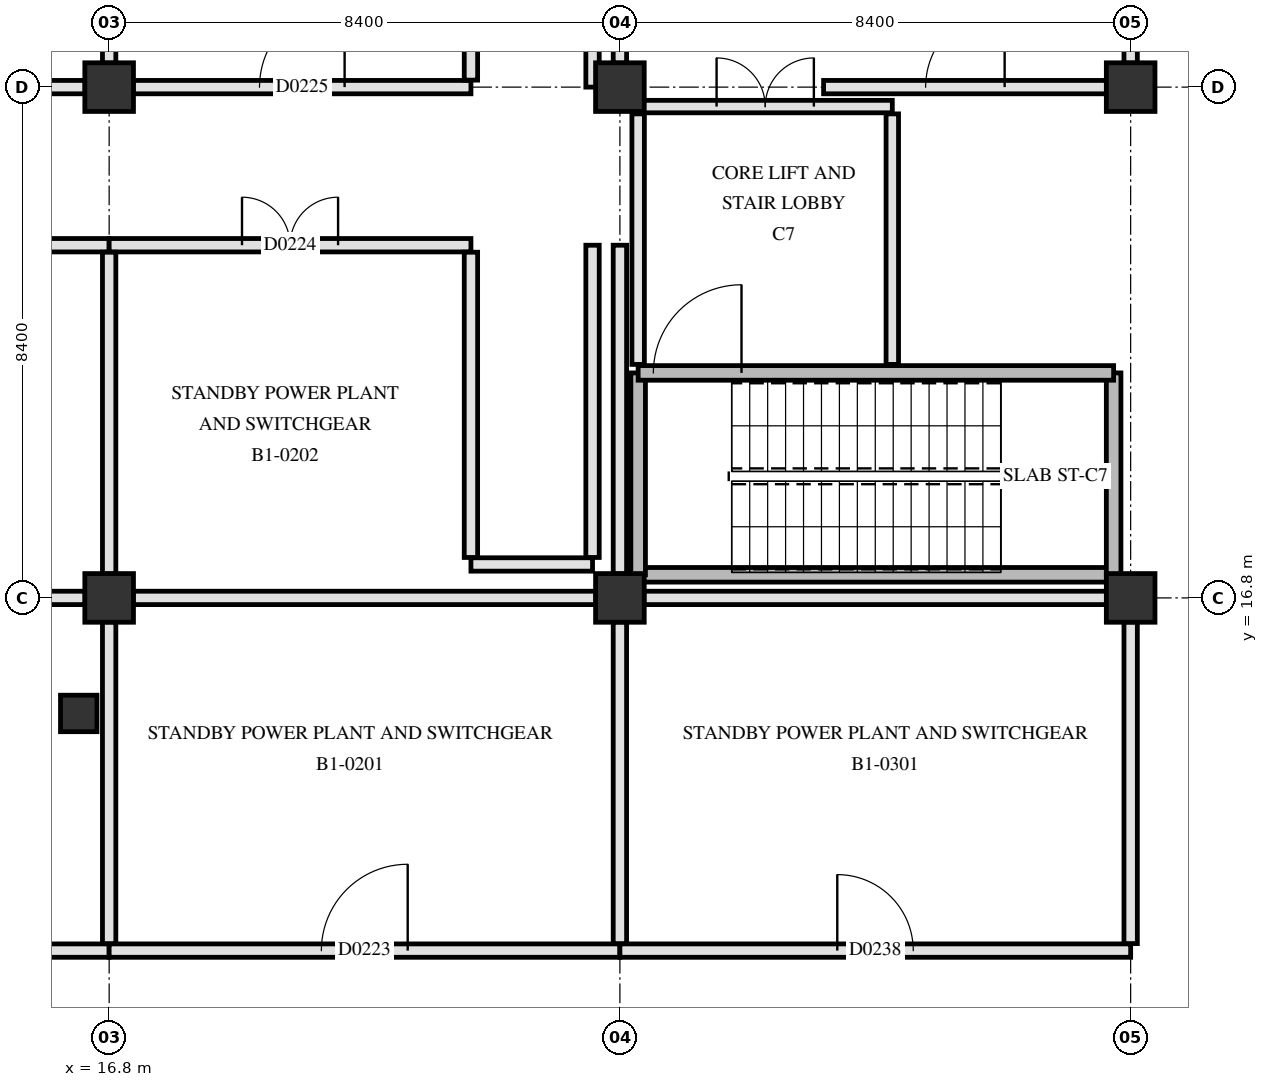
"""IFC4 building model, lengths in metres.
Left out: names, types, materials, properties, quantities, classifications, styles, units other than length and angle.
Written with IfcOpenShell. Run it as: python <this file> out.ifc"""

import sys

from ifc_helpers import new_model, si_unit, direction, frame, frame_2d, origin, origin_2d, place, context, subcontext, project, spatial, rectangle, extrude, element, fill, save


model = new_model("IFC4")
c1 = context("Model", 3, precision=1e-05, world=origin(), true_north=direction((0.0, 1.0)))
c2 = subcontext(c1, "Body", "Model", "MODEL_VIEW")
j1 = project(units=[si_unit("LENGTHUNIT", "METRE"), si_unit("PLANEANGLEUNIT", "RADIAN")], contexts=[c1])
p1 = place(None, origin())
s1 = spatial("IfcSite", under=j1, at=p1, CompositionType="ELEMENT")
p2 = place(p1, origin())
s2 = spatial("IfcBuilding", under=s1, at=p2, CompositionType="ELEMENT")
p3 = place(p2, frame((0.0, 0.0, -5.4)))
s3 = spatial("IfcBuildingStorey", under=s2, at=p3, CompositionType="ELEMENT", Elevation=-5.4)
for number, where, z_axis, x_axis in (
    (1, (16.8, 16.8, 0.0), (0.0, 0.0, 1.0), (1.0, 0.0, 0.0)),
    (2, (16.8, 25.2, 0.0), (0.0, 0.0, 1.0), (1.0, 0.0, 0.0)),
    (3, (25.2, 16.8, 0.0), (0.0, 0.0, 1.0), (1.0, 0.0, 0.0)),
    (4, (25.2, 25.2, 0.0), (0.0, 0.0, 1.0), (1.0, 0.0, 0.0)),
    (5, (33.6, 16.8, 0.0), (0.0, 0.0, 1.0), (1.0, 0.0, 0.0)),
    (6, (33.6, 25.2, 0.0), (0.0, 0.0, 1.0), (1.0, 0.0, 0.0)),
):
    element("IfcColumn", number, at=place(p3, frame(where, z_axis=z_axis, x_axis=x_axis)), inside=s3, PredefinedType="COLUMN", context=c2, shape_type="SweptSolid", body=[
        extrude(rectangle(XDim=0.8, YDim=0.8, at=origin_2d()), origin(), (0.0, 0.0, 1.0), 5.4),
    ])
p4 = place(p3, frame((16.3, 14.9, 0.0), z_axis=(0.0, 0.0, 1.0), x_axis=(1.0, 0.0, 0.0)))
e7 = element("IfcColumn", 7, at=p4, inside=s3, PredefinedType="COLUMN", context=c2, shape_type="SweptSolid", body=[
    extrude(rectangle(XDim=0.6, YDim=0.6, at=origin_2d()), origin(), (0.0, 0.0, 1.0), 5.09),
])
p5 = place(p3, frame((25.5, 17.18, 0.0), z_axis=(0.0, 0.0, 1.0), x_axis=(1.0, 0.0, 0.0)))
e8 = element("IfcWall", 8, at=p5, inside=s3, PredefinedType="SHEAR", context=c2, shape_type="SweptSolid", body=[
    extrude(rectangle(XDim=7.82, YDim=0.24, at=frame_2d((3.91, 0.0))), origin(), (0.0, 0.0, 1.0), 5.08),
])
for number, where, z_axis, x_axis in (
    (9, (25.5, 17.18, 0.0), (0.0, 0.0, 1.0), (0.0, 1.0, 0.0)),
    (10, (33.32, 17.18, 0.0), (0.0, 0.0, 1.0), (0.0, 1.0, 0.0)),
):
    element("IfcWall", number, at=place(p3, frame(where, z_axis=z_axis, x_axis=x_axis)), inside=s3, PredefinedType="SHEAR", context=c2, shape_type="SweptSolid", body=[
        extrude(rectangle(XDim=3.32, YDim=0.24, at=frame_2d((1.66, 0.0))), origin(), (0.0, 0.0, 1.0), 5.08),
    ])
p6 = place(p3, frame((25.5, 20.5, 0.0), z_axis=(0.0, 0.0, 1.0), x_axis=(1.0, 0.0, 0.0)))
e11 = element("IfcWall", 11, at=p6, inside=s3, PredefinedType="SHEAR", context=c2, shape_type="SweptSolid", body=[
    extrude(rectangle(XDim=7.82, YDim=0.24, at=frame_2d((3.91, 0.0))), origin(), (0.0, 0.0, 1.0), 5.08),
])
p7 = place(p6, frame((0.25, 0.0, 0.0)))
e12 = element("IfcOpeningElement", 12, at=p7, cuts=e11, PredefinedType="OPENING", context=c2, shape_type="SweptSolid", body=[
    extrude(rectangle(XDim=1.45, YDim=2.2, at=frame_2d((0.725, 1.1))), frame((0.0, 0.13, 0.0), z_axis=(0.0, -1.0, 0.0), x_axis=(1.0, 0.0, 0.0)), (0.0, 0.0, 1.0), 0.26),
])
p8 = place(p3, frame((29.68, 20.64, 0.0), z_axis=(0.0, 0.0, 1.0), x_axis=(0.0, 1.0, 0.0)))
e13 = element("IfcWall", 13, at=p8, inside=s3, PredefinedType="PARTITIONING", context=c2, shape_type="SweptSolid", body=[
    extrude(rectangle(XDim=4.12, YDim=0.205, at=frame_2d((2.06, 0.0))), origin(), (0.0, 0.0, 1.0), 5.07),
])
p9 = place(p3, frame((25.5, 20.64, 0.0), z_axis=(0.0, 0.0, 1.0), x_axis=(0.0, 1.0, 0.0)))
e14 = element("IfcWall", 14, at=p9, inside=s3, PredefinedType="PARTITIONING", context=c2, shape_type="SweptSolid", body=[
    extrude(rectangle(XDim=4.12, YDim=0.205, at=frame_2d((2.06, 0.0))), origin(), (0.0, 0.0, 1.0), 4.47),
])
p10 = place(p3, frame((25.5, 24.88, 0.0), z_axis=(0.0, 0.0, 1.0), x_axis=(1.0, 0.0, 0.0)))
e15 = element("IfcWall", 15, at=p10, inside=s3, PredefinedType="PARTITIONING", context=c2, shape_type="SweptSolid", body=[
    extrude(rectangle(XDim=4.18, YDim=0.205, at=frame_2d((2.09, 0.0))), origin(), (0.0, 0.0, 1.0), 4.42),
])
p11 = place(p10, frame((1.29, 0.0, 0.0)))
e16 = element("IfcOpeningElement", 16, at=p11, cuts=e15, PredefinedType="OPENING", context=c2, shape_type="SweptSolid", body=[
    extrude(rectangle(XDim=1.6, YDim=2.25, at=frame_2d((0.8, 1.125))), frame((0.0, 0.113, 0.0), z_axis=(0.0, -1.0, 0.0), x_axis=(1.0, 0.0, 0.0)), (0.0, 0.0, 1.0), 0.225),
])
p12 = place(p3, frame((8.4, 11.0, 0.0), z_axis=(0.0, 0.0, 1.0), x_axis=(1.0, 0.0, 0.0)))
e17 = element("IfcWall", 17, at=p12, inside=s3, PredefinedType="PARTITIONING", context=c2, shape_type="SweptSolid", body=[
    extrude(rectangle(XDim=8.4, YDim=0.22, at=frame_2d((4.2, 0.0))), origin(), (0.0, 0.0, 1.0), 4.47),
])
p13 = place(p12, frame((3.55, 0.0, 0.0)))
e18 = element("IfcOpeningElement", 18, at=p13, cuts=e17, PredefinedType="OPENING", context=c2, shape_type="SweptSolid", body=[
    extrude(rectangle(XDim=1.3, YDim=2.2, at=frame_2d((0.65, 1.1))), frame((0.0, 0.12, 0.0), z_axis=(0.0, -1.0, 0.0), x_axis=(1.0, 0.0, 0.0)), (0.0, 0.0, 1.0), 0.24),
])
p14 = place(p3, frame((16.8, 11.0, 0.0), z_axis=(0.0, 0.0, 1.0), x_axis=(1.0, 0.0, 0.0)))
e19 = element("IfcWall", 19, at=p14, inside=s3, PredefinedType="PARTITIONING", context=c2, shape_type="SweptSolid", body=[
    extrude(rectangle(XDim=8.4, YDim=0.22, at=frame_2d((4.2, 0.0))), origin(), (0.0, 0.0, 1.0), 4.47),
])
p15 = place(p14, frame((3.49, 0.0, 0.0)))
e20 = element("IfcOpeningElement", 20, at=p15, cuts=e19, PredefinedType="OPENING", context=c2, shape_type="SweptSolid", body=[
    extrude(rectangle(XDim=1.42, YDim=2.22, at=frame_2d((0.71, 1.11))), frame((0.0, 0.12, 0.0), z_axis=(0.0, -1.0, 0.0), x_axis=(1.0, 0.0, 0.0)), (0.0, 0.0, 1.0), 0.24),
])
p16 = place(p3, frame((25.2, 11.0, 0.0), z_axis=(0.0, 0.0, 1.0), x_axis=(1.0, 0.0, 0.0)))
e21 = element("IfcWall", 21, at=p16, inside=s3, PredefinedType="PARTITIONING", context=c2, shape_type="SweptSolid", body=[
    extrude(rectangle(XDim=8.4, YDim=0.22, at=frame_2d((4.2, 0.0))), origin(), (0.0, 0.0, 1.0), 4.47),
])
p17 = place(p16, frame((3.575, 0.0, 0.0)))
e22 = element("IfcOpeningElement", 22, at=p17, cuts=e21, PredefinedType="OPENING", context=c2, shape_type="SweptSolid", body=[
    extrude(rectangle(XDim=1.25, YDim=2.2, at=frame_2d((0.625, 1.1))), frame((0.0, 0.12, 0.0), z_axis=(0.0, -1.0, 0.0), x_axis=(1.0, 0.0, 0.0)), (0.0, 0.0, 1.0), 0.24),
])
p18 = place(p3, frame((8.795, 16.8, 0.0), z_axis=(0.0, 0.0, 1.0), x_axis=(1.0, 0.0, 0.0)))
e23 = element("IfcWall", 23, at=p18, inside=s3, PredefinedType="PARTITIONING", context=c2, shape_type="SweptSolid", body=[
    extrude(rectangle(XDim=7.61, YDim=0.22, at=frame_2d((3.805, 0.0))), origin(), (0.0, 0.0, 1.0), 4.42),
])
p19 = place(p3, frame((17.195, 16.8, 0.0), z_axis=(0.0, 0.0, 1.0), x_axis=(1.0, 0.0, 0.0)))
e24 = element("IfcWall", 24, at=p19, inside=s3, PredefinedType="PARTITIONING", context=c2, shape_type="SweptSolid", body=[
    extrude(rectangle(XDim=7.61, YDim=0.22, at=frame_2d((3.805, 0.0))), origin(), (0.0, 0.0, 1.0), 4.42),
])
p20 = place(p3, frame((25.595, 16.8, 0.0), z_axis=(0.0, 0.0, 1.0), x_axis=(1.0, 0.0, 0.0)))
e25 = element("IfcWall", 25, at=p20, inside=s3, PredefinedType="PARTITIONING", context=c2, shape_type="SweptSolid", body=[
    extrude(rectangle(XDim=7.61, YDim=0.22, at=frame_2d((3.805, 0.0))), origin(), (0.0, 0.0, 1.0), 4.42),
])
p21 = place(p3, frame((22.75, 17.35, 0.0), z_axis=(0.0, 0.0, 1.0), x_axis=(1.0, 0.0, 0.0)))
e26 = element("IfcWall", 26, at=p21, inside=s3, PredefinedType="PARTITIONING", context=c2, shape_type="SweptSolid", body=[
    extrude(rectangle(XDim=2.0, YDim=0.22, at=frame_2d((1.0, 0.0))), origin(), (0.0, 0.0, 1.0), 5.07),
])
p22 = place(p3, frame((8.4, 22.6, 0.0), z_axis=(0.0, 0.0, 1.0), x_axis=(1.0, 0.0, 0.0)))
e27 = element("IfcWall", 27, at=p22, inside=s3, PredefinedType="PARTITIONING", context=c2, shape_type="SweptSolid", body=[
    extrude(rectangle(XDim=8.4, YDim=0.22, at=frame_2d((4.2, 0.0))), origin(), (0.0, 0.0, 1.0), 4.47),
])
p23 = place(p22, frame((3.46, 0.0, 0.0)))
e28 = element("IfcOpeningElement", 28, at=p23, cuts=e27, PredefinedType="OPENING", context=c2, shape_type="SweptSolid", body=[
    extrude(rectangle(XDim=1.48, YDim=2.22, at=frame_2d((0.74, 1.11))), frame((0.0, 0.12, 0.0), z_axis=(0.0, -1.0, 0.0), x_axis=(1.0, 0.0, 0.0)), (0.0, 0.0, 1.0), 0.24),
])
p24 = place(p3, frame((16.8, 22.6, 0.0), z_axis=(0.0, 0.0, 1.0), x_axis=(1.0, 0.0, 0.0)))
e29 = element("IfcWall", 29, at=p24, inside=s3, PredefinedType="PARTITIONING", context=c2, shape_type="SweptSolid", body=[
    extrude(rectangle(XDim=5.95, YDim=0.22, at=frame_2d((2.975, 0.0))), origin(), (0.0, 0.0, 1.0), 4.47),
])
p25 = place(p24, frame((2.185, 0.0, 0.0)))
e30 = element("IfcOpeningElement", 30, at=p25, cuts=e29, PredefinedType="OPENING", context=c2, shape_type="SweptSolid", body=[
    extrude(rectangle(XDim=1.58, YDim=2.22, at=frame_2d((0.79, 1.11))), frame((0.0, 0.12, 0.0), z_axis=(0.0, -1.0, 0.0), x_axis=(1.0, 0.0, 0.0)), (0.0, 0.0, 1.0), 0.24),
])
p26 = place(p3, frame((8.795, 25.2, 0.0), z_axis=(0.0, 0.0, 1.0), x_axis=(1.0, 0.0, 0.0)))
e31 = element("IfcWall", 31, at=p26, inside=s3, PredefinedType="PARTITIONING", context=c2, shape_type="SweptSolid", body=[
    extrude(rectangle(XDim=7.61, YDim=0.22, at=frame_2d((3.805, 0.0))), origin(), (0.0, 0.0, 1.0), 4.42),
])
p27 = place(p26, frame((3.035, 0.0, 0.0)))
e32 = element("IfcOpeningElement", 32, at=p27, cuts=e31, PredefinedType="OPENING", context=c2, shape_type="SweptSolid", body=[
    extrude(rectangle(XDim=1.54, YDim=2.24, at=frame_2d((0.77, 1.12))), frame((0.0, 0.12, 0.0), z_axis=(0.0, -1.0, 0.0), x_axis=(1.0, 0.0, 0.0)), (0.0, 0.0, 1.0), 0.24),
])
p28 = place(p3, frame((17.195, 25.2, 0.0), z_axis=(0.0, 0.0, 1.0), x_axis=(1.0, 0.0, 0.0)))
e33 = element("IfcWall", 33, at=p28, inside=s3, PredefinedType="PARTITIONING", context=c2, shape_type="SweptSolid", body=[
    extrude(rectangle(XDim=5.555, YDim=0.22, at=frame_2d((2.777, 0.0))), origin(), (0.0, 0.0, 1.0), 4.42),
])
p29 = place(p28, frame((2.077, 0.0, 0.0)))
e34 = element("IfcOpeningElement", 34, at=p29, cuts=e33, PredefinedType="OPENING", context=c2, shape_type="SweptSolid", body=[
    extrude(rectangle(XDim=1.4, YDim=2.2, at=frame_2d((0.7, 1.1))), frame((0.0, 0.12, 0.0), z_axis=(0.0, -1.0, 0.0), x_axis=(1.0, 0.0, 0.0)), (0.0, 0.0, 1.0), 0.24),
])
p30 = place(p3, frame((28.55, 25.2, 0.0), z_axis=(0.0, 0.0, 1.0), x_axis=(1.0, 0.0, 0.0)))
e35 = element("IfcWall", 35, at=p30, inside=s3, PredefinedType="PARTITIONING", context=c2, shape_type="SweptSolid", body=[
    extrude(rectangle(XDim=4.655, YDim=0.22, at=frame_2d((2.328, 0.0))), origin(), (0.0, 0.0, 1.0), 4.42),
])
p31 = place(p30, frame((1.677, 0.0, 0.0)))
e36 = element("IfcOpeningElement", 36, at=p31, cuts=e35, PredefinedType="OPENING", context=c2, shape_type="SweptSolid", body=[
    extrude(rectangle(XDim=1.3, YDim=2.2, at=frame_2d((0.65, 1.1))), frame((0.0, 0.12, 0.0), z_axis=(0.0, -1.0, 0.0), x_axis=(1.0, 0.0, 0.0)), (0.0, 0.0, 1.0), 0.24),
])
for number, where, z_axis, x_axis in (
    (37, (16.8, 11.115, 0.0), (0.0, 0.0, 1.0), (0.0, 1.0, 0.0)),
    (38, (16.8, 17.195, 0.0), (0.0, 0.0, 1.0), (0.0, 1.0, 0.0)),
):
    element("IfcWall", number, at=place(p3, frame(where, z_axis=z_axis, x_axis=x_axis)), inside=s3, PredefinedType="PARTITIONING", context=c2, shape_type="SweptSolid", body=[
        extrude(rectangle(XDim=5.29, YDim=0.22, at=frame_2d((2.645, 0.0))), origin(), (0.0, 0.0, 1.0), 4.47),
    ])
p32 = place(p3, frame((16.8, 25.595, 0.0), z_axis=(0.0, 0.0, 1.0), x_axis=(0.0, 1.0, 0.0)))
e39 = element("IfcWall", 39, at=p32, inside=s3, PredefinedType="PARTITIONING", context=c2, shape_type="SweptSolid", body=[
    extrude(rectangle(XDim=7.61, YDim=0.22, at=frame_2d((3.805, 0.0))), origin(), (0.0, 0.0, 1.0), 4.47),
])
p33 = place(p3, frame((22.75, 17.465, 0.0), z_axis=(0.0, 0.0, 1.0), x_axis=(0.0, 1.0, 0.0)))
e40 = element("IfcWall", 40, at=p33, inside=s3, PredefinedType="PARTITIONING", context=c2, shape_type="SweptSolid", body=[
    extrude(rectangle(XDim=5.02, YDim=0.22, at=frame_2d((2.51, 0.0))), origin(), (0.0, 0.0, 1.0), 5.07),
])
p34 = place(p3, frame((22.75, 25.315, 0.0), z_axis=(0.0, 0.0, 1.0), x_axis=(0.0, 1.0, 0.0)))
e41 = element("IfcWall", 41, at=p34, inside=s3, PredefinedType="PARTITIONING", context=c2, shape_type="SweptSolid", body=[
    extrude(rectangle(XDim=2.22, YDim=0.22, at=frame_2d((1.11, 0.0))), origin(), (0.0, 0.0, 1.0), 4.42),
])
p35 = place(p3, frame((24.75, 17.465, 0.0), z_axis=(0.0, 0.0, 1.0), x_axis=(0.0, 1.0, 0.0)))
e42 = element("IfcWall", 42, at=p35, inside=s3, PredefinedType="PARTITIONING", context=c2, shape_type="SweptSolid", body=[
    extrude(rectangle(XDim=5.135, YDim=0.22, at=frame_2d((2.567, 0.0))), origin(), (0.0, 0.0, 1.0), 5.07),
])
p36 = place(p3, frame((24.75, 25.2, 0.0), z_axis=(0.0, 0.0, 1.0), x_axis=(0.0, 1.0, 0.0)))
e43 = element("IfcWall", 43, at=p36, inside=s3, PredefinedType="PARTITIONING", context=c2, shape_type="SweptSolid", body=[
    extrude(rectangle(XDim=2.335, YDim=0.22, at=frame_2d((1.167, 0.0))), origin(), (0.0, 0.0, 1.0), 4.42),
])
p37 = place(p3, frame((25.2, 11.115, 0.0), z_axis=(0.0, 0.0, 1.0), x_axis=(0.0, 1.0, 0.0)))
e44 = element("IfcWall", 44, at=p37, inside=s3, PredefinedType="PARTITIONING", context=c2, shape_type="SweptSolid", body=[
    extrude(rectangle(XDim=5.29, YDim=0.22, at=frame_2d((2.645, 0.0))), origin(), (0.0, 0.0, 1.0), 4.47),
])
p38 = place(p3, frame((25.2, 17.195, 0.0), z_axis=(0.0, 0.0, 1.0), x_axis=(0.0, 1.0, 0.0)))
e45 = element("IfcWall", 45, at=p38, inside=s3, PredefinedType="PARTITIONING", context=c2, shape_type="SweptSolid", body=[
    extrude(rectangle(XDim=5.405, YDim=0.22, at=frame_2d((2.703, 0.0))), origin(), (0.0, 0.0, 1.0), 4.47),
])
p39 = place(p3, frame((25.2, 25.595, 0.0), z_axis=(0.0, 0.0, 1.0), x_axis=(0.0, 1.0, 0.0)))
e46 = element("IfcWall", 46, at=p39, inside=s3, PredefinedType="PARTITIONING", context=c2, shape_type="SweptSolid", body=[
    extrude(rectangle(XDim=7.61, YDim=0.22, at=frame_2d((3.805, 0.0))), origin(), (0.0, 0.0, 1.0), 4.47),
])
p40 = place(p3, frame((33.6, 11.115, 0.0), z_axis=(0.0, 0.0, 1.0), x_axis=(0.0, 1.0, 0.0)))
e47 = element("IfcWall", 47, at=p40, inside=s3, PredefinedType="PARTITIONING", context=c2, shape_type="SweptSolid", body=[
    extrude(rectangle(XDim=5.29, YDim=0.22, at=frame_2d((2.645, 0.0))), origin(), (0.0, 0.0, 1.0), 4.47),
])
p41 = place(p3, frame((33.6, 25.595, 0.0), z_axis=(0.0, 0.0, 1.0), x_axis=(0.0, 1.0, 0.0)))
e48 = element("IfcWall", 48, at=p41, inside=s3, PredefinedType="PARTITIONING", context=c2, shape_type="SweptSolid", body=[
    extrude(rectangle(XDim=7.61, YDim=0.22, at=frame_2d((3.805, 0.0))), origin(), (0.0, 0.0, 1.0), 4.47),
])
p42 = place(p7, origin())
e49 = element("IfcDoor", 49, at=p42, inside=s3, OperationType="SINGLE_SWING_RIGHT", PredefinedType="DOOR", context=c2, shape_type="SweptSolid", body=[
    extrude(rectangle(XDim=1.45, YDim=2.2, at=frame_2d((0.725, 1.1))), frame((0.0, 0.025, 0.0), z_axis=(0.0, -1.0, 0.0), x_axis=(1.0, 0.0, 0.0)), (0.0, 0.0, 1.0), 0.05),
])
fill(e12, e49)
p43 = place(p11, origin())
e50 = element("IfcDoor", 50, at=p43, inside=s3, OperationType="DOUBLE_SWING_LEFT", PredefinedType="DOOR", context=c2, shape_type="SweptSolid", body=[
    extrude(rectangle(XDim=1.6, YDim=2.25, at=frame_2d((0.8, 1.125))), frame((0.0, 0.025, 0.0), z_axis=(0.0, -1.0, 0.0), x_axis=(1.0, 0.0, 0.0)), (0.0, 0.0, 1.0), 0.05),
])
fill(e16, e50)
p44 = place(p15, origin())
e51 = element("IfcDoor", 51, at=p44, inside=s3, OperationType="SINGLE_SWING_RIGHT", PredefinedType="DOOR", context=c2, shape_type="SweptSolid", body=[
    extrude(rectangle(XDim=1.42, YDim=2.22, at=frame_2d((0.71, 1.11))), frame((0.0, 0.025, 0.0), z_axis=(0.0, -1.0, 0.0), x_axis=(1.0, 0.0, 0.0)), (0.0, 0.0, 1.0), 0.05),
])
fill(e20, e51)
p45 = place(p25, origin())
e52 = element("IfcDoor", 52, at=p45, inside=s3, OperationType="DOUBLE_SWING_LEFT", PredefinedType="DOOR", context=c2, shape_type="SweptSolid", body=[
    extrude(rectangle(XDim=1.58, YDim=2.22, at=frame_2d((0.79, 1.11))), frame((0.0, 0.025, 0.0), z_axis=(0.0, -1.0, 0.0), x_axis=(1.0, 0.0, 0.0)), (0.0, 0.0, 1.0), 0.05),
])
fill(e30, e52)
p46 = place(p29, origin())
e53 = element("IfcDoor", 53, at=p46, inside=s3, OperationType="SINGLE_SWING_RIGHT", PredefinedType="DOOR", context=c2, shape_type="SweptSolid", body=[
    extrude(rectangle(XDim=1.4, YDim=2.2, at=frame_2d((0.7, 1.1))), frame((0.0, 0.025, 0.0), z_axis=(0.0, -1.0, 0.0), x_axis=(1.0, 0.0, 0.0)), (0.0, 0.0, 1.0), 0.05),
])
fill(e34, e53)
p47 = place(p17, origin())
e54 = element("IfcDoor", 54, at=p47, inside=s3, OperationType="SINGLE_SWING_LEFT", PredefinedType="DOOR", context=c2, shape_type="SweptSolid", body=[
    extrude(rectangle(XDim=1.25, YDim=2.2, at=frame_2d((0.625, 1.1))), frame((0.0, 0.025, 0.0), z_axis=(0.0, -1.0, 0.0), x_axis=(1.0, 0.0, 0.0)), (0.0, 0.0, 1.0), 0.05),
])
fill(e22, e54)
p48 = place(p31, origin())
e55 = element("IfcDoor", 55, at=p48, inside=s3, OperationType="SINGLE_SWING_RIGHT", PredefinedType="DOOR", context=c2, shape_type="SweptSolid", body=[
    extrude(rectangle(XDim=1.3, YDim=2.2, at=frame_2d((0.65, 1.1))), frame((0.0, 0.025, 0.0), z_axis=(0.0, -1.0, 0.0), x_axis=(1.0, 0.0, 0.0)), (0.0, 0.0, 1.0), 0.05),
])
fill(e36, e55)
save(model, sys.argv[1])
